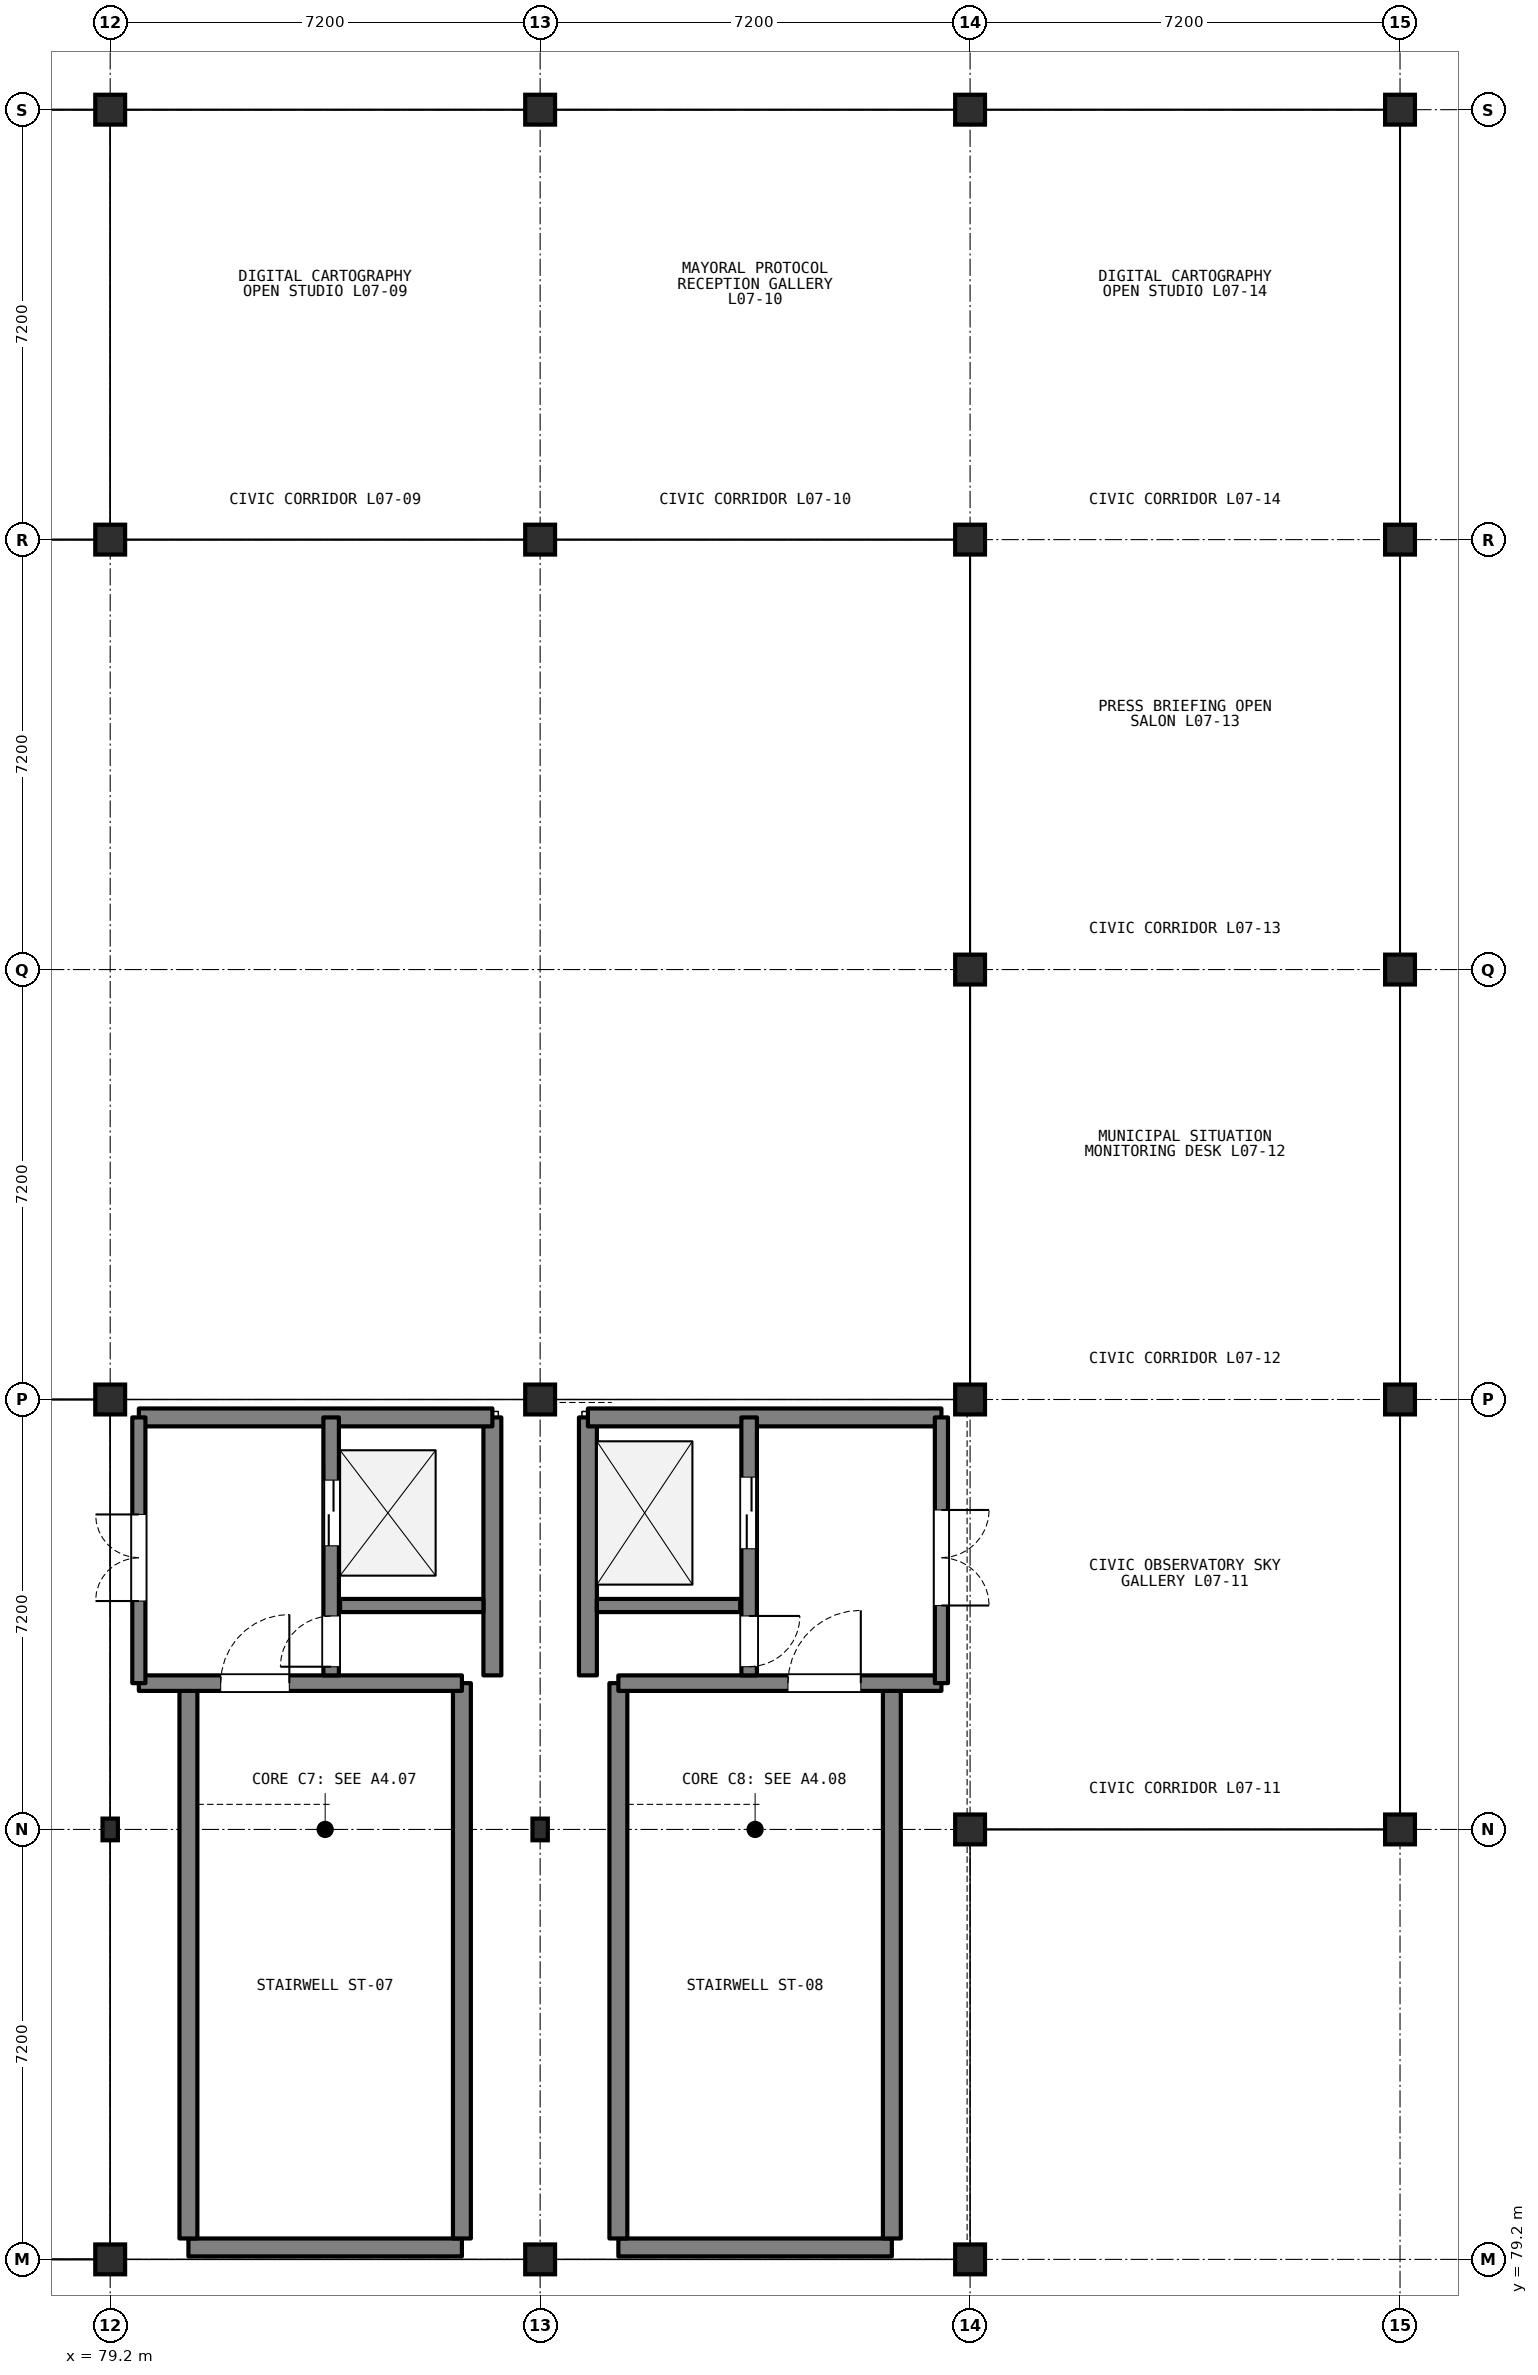
"""IFC4 building model, lengths in metres.
Left out: names, types, materials, properties, quantities, classifications, styles, units other than length and angle.
Written with IfcOpenShell. Run it as: python <this file> out.ifc"""

import sys

from ifc_helpers import new_model, si_unit, direction, frame, frame_2d, origin, origin_2d, place, context, subcontext, project, spatial, rectangle, i_section, extrude, element, fill, save


model = new_model("IFC4")
c1 = context("Model", 3, precision=1e-05, world=origin(), true_north=direction((0.0, 1.0)))
c2 = subcontext(c1, "Body", "Model", "MODEL_VIEW")
j1 = project(units=[si_unit("LENGTHUNIT", "METRE"), si_unit("PLANEANGLEUNIT", "RADIAN")], contexts=[c1])
p1 = place(None, origin())
s1 = spatial("IfcSite", under=j1, at=p1, CompositionType="ELEMENT")
p2 = place(p1, origin())
s2 = spatial("IfcBuilding", under=s1, at=p2, CompositionType="ELEMENT")
p3 = place(p2, frame((0.0, 0.0, 25.8)))
s3 = spatial("IfcBuildingStorey", under=s2, at=p3, CompositionType="ELEMENT", Elevation=25.8)
p4 = place(p3, frame((79.2, 79.2, 0.0), z_axis=(0.0, 0.0, 1.0), x_axis=(1.0, 0.0, 0.0)))
e1 = element("IfcColumn", 1, at=p4, inside=s3, PredefinedType="COLUMN", context=c2, shape_type="SweptSolid", body=[
    extrude(rectangle(XDim=0.5, YDim=0.5, at=origin_2d()), origin(), (0.0, 0.0, 1.0), 2.437),
])
p5 = place(p3, frame((79.2, 86.4, 0.0), z_axis=(0.0, 0.0, 1.0), x_axis=(1.0, 0.0, 0.0)))
e2 = element("IfcColumn", 2, at=p5, inside=s3, PredefinedType="COLUMN", context=c2, shape_type="SweptSolid", body=[
    extrude(i_section(OverallWidth=0.257, OverallDepth=0.363, WebThickness=0.013, FlangeThickness=0.022, FilletRadius=0.015, at=origin_2d()), origin(), (0.0, 0.0, 1.0), 3.733),
])
for number, where, z_axis, x_axis in (
    (3, (79.2, 93.6, 0.0), (0.0, 0.0, 1.0), (1.0, 0.0, 0.0)),
    (4, (79.2, 108.0, 0.0), (0.0, 0.0, 1.0), (1.0, 0.0, 0.0)),
    (5, (79.2, 115.2, 0.0), (0.0, 0.0, 1.0), (1.0, 0.0, 0.0)),
):
    element("IfcColumn", number, at=place(p3, frame(where, z_axis=z_axis, x_axis=x_axis)), inside=s3, PredefinedType="COLUMN", context=c2, shape_type="SweptSolid", body=[
        extrude(rectangle(XDim=0.5, YDim=0.5, at=origin_2d()), origin(), (0.0, 0.0, 1.0), 4.2),
    ])
p6 = place(p3, frame((86.4, 79.2, 0.0), z_axis=(0.0, 0.0, 1.0), x_axis=(1.0, 0.0, 0.0)))
e6 = element("IfcColumn", 6, at=p6, inside=s3, PredefinedType="COLUMN", context=c2, shape_type="SweptSolid", body=[
    extrude(rectangle(XDim=0.5, YDim=0.5, at=origin_2d()), origin(), (0.0, 0.0, 1.0), 2.437),
])
p7 = place(p3, frame((86.4, 86.4, 0.0), z_axis=(0.0, 0.0, 1.0), x_axis=(1.0, 0.0, 0.0)))
e7 = element("IfcColumn", 7, at=p7, inside=s3, PredefinedType="COLUMN", context=c2, shape_type="SweptSolid", body=[
    extrude(i_section(OverallWidth=0.257, OverallDepth=0.363, WebThickness=0.013, FlangeThickness=0.022, FilletRadius=0.015, at=origin_2d()), origin(), (0.0, 0.0, 1.0), 3.733),
])
for number, where, z_axis, x_axis in (
    (8, (86.4, 93.6, 0.0), (0.0, 0.0, 1.0), (1.0, 0.0, 0.0)),
    (9, (86.4, 108.0, 0.0), (0.0, 0.0, 1.0), (1.0, 0.0, 0.0)),
    (10, (86.4, 115.2, 0.0), (0.0, 0.0, 1.0), (1.0, 0.0, 0.0)),
):
    element("IfcColumn", number, at=place(p3, frame(where, z_axis=z_axis, x_axis=x_axis)), inside=s3, PredefinedType="COLUMN", context=c2, shape_type="SweptSolid", body=[
        extrude(rectangle(XDim=0.5, YDim=0.5, at=origin_2d()), origin(), (0.0, 0.0, 1.0), 4.2),
    ])
p8 = place(p3, frame((93.6, 79.2, 0.0), z_axis=(0.0, 0.0, 1.0), x_axis=(1.0, 0.0, 0.0)))
e11 = element("IfcColumn", 11, at=p8, inside=s3, PredefinedType="COLUMN", context=c2, shape_type="SweptSolid", body=[
    extrude(rectangle(XDim=0.5, YDim=0.5, at=origin_2d()), origin(), (0.0, 0.0, 1.0), 2.437),
])
p9 = place(p3, frame((93.6, 86.4, 0.0), z_axis=(0.0, 0.0, 1.0), x_axis=(1.0, 0.0, 0.0)))
e12 = element("IfcColumn", 12, at=p9, inside=s3, PredefinedType="COLUMN", context=c2, shape_type="SweptSolid", body=[
    extrude(rectangle(XDim=0.5, YDim=0.5, at=origin_2d()), origin(), (0.0, 0.0, 1.0), 3.733),
])
for number, where, z_axis, x_axis in (
    (13, (93.6, 93.6, 0.0), (0.0, 0.0, 1.0), (1.0, 0.0, 0.0)),
    (14, (93.6, 100.8, 0.0), (0.0, 0.0, 1.0), (1.0, 0.0, 0.0)),
    (15, (93.6, 108.0, 0.0), (0.0, 0.0, 1.0), (1.0, 0.0, 0.0)),
    (16, (93.6, 115.2, 0.0), (0.0, 0.0, 1.0), (1.0, 0.0, 0.0)),
):
    element("IfcColumn", number, at=place(p3, frame(where, z_axis=z_axis, x_axis=x_axis)), inside=s3, PredefinedType="COLUMN", context=c2, shape_type="SweptSolid", body=[
        extrude(rectangle(XDim=0.5, YDim=0.5, at=origin_2d()), origin(), (0.0, 0.0, 1.0), 4.2),
    ])
p10 = place(p3, frame((100.8, 86.4, 0.0), z_axis=(0.0, 0.0, 1.0), x_axis=(1.0, 0.0, 0.0)))
e17 = element("IfcColumn", 17, at=p10, inside=s3, PredefinedType="COLUMN", context=c2, shape_type="SweptSolid", body=[
    extrude(rectangle(XDim=0.5, YDim=0.5, at=origin_2d()), origin(), (0.0, 0.0, 1.0), 3.733),
])
for number, where, z_axis, x_axis in (
    (18, (100.8, 93.6, 0.0), (0.0, 0.0, 1.0), (1.0, 0.0, 0.0)),
    (19, (100.8, 100.8, 0.0), (0.0, 0.0, 1.0), (1.0, 0.0, 0.0)),
    (20, (100.8, 108.0, 0.0), (0.0, 0.0, 1.0), (1.0, 0.0, 0.0)),
    (21, (100.8, 115.2, 0.0), (0.0, 0.0, 1.0), (1.0, 0.0, 0.0)),
):
    element("IfcColumn", number, at=place(p3, frame(where, z_axis=z_axis, x_axis=x_axis)), inside=s3, PredefinedType="COLUMN", context=c2, shape_type="SweptSolid", body=[
        extrude(rectangle(XDim=0.5, YDim=0.5, at=origin_2d()), origin(), (0.0, 0.0, 1.0), 4.2),
    ])
p11 = place(p3, frame((80.51, 79.4, 0.0), z_axis=(0.0, 0.0, 1.0), x_axis=(1.0, 0.0, 0.0)))
e22 = element("IfcWall", 22, at=p11, inside=s3, PredefinedType="SHEAR", context=c2, shape_type="SweptSolid", body=[
    extrude(rectangle(XDim=4.58, YDim=0.3, at=frame_2d((2.29, 0.0))), origin(), (0.0, 0.0, 1.0), 5.26),
])
for number, where, z_axis, x_axis in (
    (23, (80.51, 79.55, 0.0), (0.0, 0.0, 1.0), (0.0, 1.0, 0.0)),
    (24, (85.09, 79.55, 0.0), (0.0, 0.0, 1.0), (0.0, 1.0, 0.0)),
):
    element("IfcWall", number, at=place(p3, frame(where, z_axis=z_axis, x_axis=x_axis)), inside=s3, PredefinedType="SHEAR", context=c2, shape_type="SweptSolid", body=[
        extrude(rectangle(XDim=9.3, YDim=0.3, at=frame_2d((4.65, 0.0))), origin(), (0.0, 0.0, 1.0), 5.26),
    ])
p12 = place(p3, frame((79.68, 88.85, 0.0), z_axis=(0.0, 0.0, 1.0), x_axis=(1.0, 0.0, 0.0)))
e25 = element("IfcWall", 25, at=p12, inside=s3, PredefinedType="SHEAR", context=c2, shape_type="SweptSolid", body=[
    extrude(rectangle(XDim=5.41, YDim=0.26, at=frame_2d((2.705, 0.0))), origin(), (0.0, 0.0, 1.0), 5.26),
])
p13 = place(p12, frame((1.37, 0.0, 0.0)))
e26 = element("IfcOpeningElement", 26, at=p13, cuts=e25, PredefinedType="OPENING", context=c2, shape_type="SweptSolid", body=[
    extrude(rectangle(XDim=1.15, YDim=2.15, at=frame_2d((0.575, 1.075))), frame((0.0, 0.14, 0.0), z_axis=(0.0, -1.0, 0.0), x_axis=(1.0, 0.0, 0.0)), (0.0, 0.0, 1.0), 0.28),
])
p14 = place(p3, frame((85.6, 88.98, 0.0), z_axis=(0.0, 0.0, 1.0), x_axis=(0.0, 1.0, 0.0)))
e27 = element("IfcWall", 27, at=p14, inside=s3, PredefinedType="SHEAR", context=c2, shape_type="SweptSolid", body=[
    extrude(rectangle(XDim=4.32, YDim=0.3, at=frame_2d((2.16, 0.0))), origin(), (0.0, 0.0, 1.0), 5.26),
])
p15 = place(p3, frame((79.68, 93.3, 0.0), z_axis=(0.0, 0.0, 1.0), x_axis=(1.0, 0.0, 0.0)))
e28 = element("IfcWall", 28, at=p15, inside=s3, PredefinedType="SHEAR", context=c2, shape_type="SweptSolid", body=[
    extrude(rectangle(XDim=5.92, YDim=0.3, at=frame_2d((2.96, 0.0))), origin(), (0.0, 0.0, 1.0), 5.26),
])
p16 = place(p3, frame((83.05, 90.15, 0.0), z_axis=(0.0, 0.0, 1.0), x_axis=(1.0, 0.0, 0.0)))
e29 = element("IfcWall", 29, at=p16, inside=s3, PredefinedType="SHEAR", context=c2, shape_type="SweptSolid", body=[
    extrude(rectangle(XDim=2.4, YDim=0.22, at=frame_2d((1.2, 0.0))), origin(), (0.0, 0.0, 1.0), 5.26),
])
p17 = place(p3, frame((82.9, 88.98, 0.0), z_axis=(0.0, 0.0, 1.0), x_axis=(0.0, 1.0, 0.0)))
e30 = element("IfcWall", 30, at=p17, inside=s3, PredefinedType="SHEAR", context=c2, shape_type="SweptSolid", body=[
    extrude(rectangle(XDim=4.32, YDim=0.26, at=frame_2d((2.16, 0.0))), origin(), (0.0, 0.0, 1.0), 5.26),
])
p18 = place(p17, frame((2.17, 0.0, 0.0)))
e31 = element("IfcOpeningElement", 31, at=p18, cuts=e30, PredefinedType="OPENING", context=c2, shape_type="SweptSolid", body=[
    extrude(rectangle(XDim=1.1, YDim=2.15, at=frame_2d((0.55, 1.075))), frame((0.0, 0.14, 0.0), z_axis=(0.0, -1.0, 0.0), x_axis=(1.0, 0.0, 0.0)), (0.0, 0.0, 1.0), 0.28),
])
p19 = place(p17, frame((0.145, 0.0, 0.0)))
e32 = element("IfcOpeningElement", 32, at=p19, cuts=e30, PredefinedType="OPENING", context=c2, shape_type="SweptSolid", body=[
    extrude(rectangle(XDim=0.85, YDim=2.05, at=frame_2d((0.425, 1.025))), frame((0.0, 0.14, 0.0), z_axis=(0.0, -1.0, 0.0), x_axis=(1.0, 0.0, 0.0)), (0.0, 0.0, 1.0), 0.28),
])
p20 = place(p3, frame((79.68, 88.85, 0.0), z_axis=(0.0, 0.0, 1.0), x_axis=(0.0, 1.0, 0.0)))
e33 = element("IfcWall", 33, at=p20, inside=s3, PredefinedType="SHEAR", context=c2, shape_type="SweptSolid", body=[
    extrude(rectangle(XDim=4.45, YDim=0.22, at=frame_2d((2.225, 0.0))), origin(), (0.0, 0.0, 1.0), 5.26),
])
p21 = place(p20, frame((1.375, 0.0, 0.0)))
e34 = element("IfcOpeningElement", 34, at=p21, cuts=e33, PredefinedType="OPENING", context=c2, shape_type="SweptSolid", body=[
    extrude(rectangle(XDim=1.45, YDim=2.2, at=frame_2d((0.725, 1.1))), frame((0.0, 0.12, 0.0), z_axis=(0.0, -1.0, 0.0), x_axis=(1.0, 0.0, 0.0)), (0.0, 0.0, 1.0), 0.24),
])
p22 = place(p3, frame((87.71, 79.4, 0.0), z_axis=(0.0, 0.0, 1.0), x_axis=(1.0, 0.0, 0.0)))
e35 = element("IfcWall", 35, at=p22, inside=s3, PredefinedType="SHEAR", context=c2, shape_type="SweptSolid", body=[
    extrude(rectangle(XDim=4.58, YDim=0.3, at=frame_2d((2.29, 0.0))), origin(), (0.0, 0.0, 1.0), 5.26),
])
for number, where, z_axis, x_axis in (
    (36, (87.71, 79.55, 0.0), (0.0, 0.0, 1.0), (0.0, 1.0, 0.0)),
    (37, (92.29, 79.55, 0.0), (0.0, 0.0, 1.0), (0.0, 1.0, 0.0)),
):
    element("IfcWall", number, at=place(p3, frame(where, z_axis=z_axis, x_axis=x_axis)), inside=s3, PredefinedType="SHEAR", context=c2, shape_type="SweptSolid", body=[
        extrude(rectangle(XDim=9.3, YDim=0.3, at=frame_2d((4.65, 0.0))), origin(), (0.0, 0.0, 1.0), 5.26),
    ])
p23 = place(p3, frame((87.71, 88.85, 0.0), z_axis=(0.0, 0.0, 1.0), x_axis=(1.0, 0.0, 0.0)))
e38 = element("IfcWall", 38, at=p23, inside=s3, PredefinedType="SHEAR", context=c2, shape_type="SweptSolid", body=[
    extrude(rectangle(XDim=5.41, YDim=0.26, at=frame_2d((2.705, 0.0))), origin(), (0.0, 0.0, 1.0), 5.26),
])
p24 = place(p23, frame((2.84, 0.0, 0.0)))
e39 = element("IfcOpeningElement", 39, at=p24, cuts=e38, PredefinedType="OPENING", context=c2, shape_type="SweptSolid", body=[
    extrude(rectangle(XDim=1.22, YDim=2.15, at=frame_2d((0.61, 1.075))), frame((0.0, 0.14, 0.0), z_axis=(0.0, -1.0, 0.0), x_axis=(1.0, 0.0, 0.0)), (0.0, 0.0, 1.0), 0.28),
])
p25 = place(p3, frame((87.2, 88.98, 0.0), z_axis=(0.0, 0.0, 1.0), x_axis=(0.0, 1.0, 0.0)))
e40 = element("IfcWall", 40, at=p25, inside=s3, PredefinedType="SHEAR", context=c2, shape_type="SweptSolid", body=[
    extrude(rectangle(XDim=4.32, YDim=0.3, at=frame_2d((2.16, 0.0))), origin(), (0.0, 0.0, 1.0), 5.26),
])
p26 = place(p3, frame((87.2, 93.3, 0.0), z_axis=(0.0, 0.0, 1.0), x_axis=(1.0, 0.0, 0.0)))
e41 = element("IfcWall", 41, at=p26, inside=s3, PredefinedType="SHEAR", context=c2, shape_type="SweptSolid", body=[
    extrude(rectangle(XDim=5.92, YDim=0.3, at=frame_2d((2.96, 0.0))), origin(), (0.0, 0.0, 1.0), 5.26),
])
p27 = place(p3, frame((87.35, 90.15, 0.0), z_axis=(0.0, 0.0, 1.0), x_axis=(1.0, 0.0, 0.0)))
e42 = element("IfcWall", 42, at=p27, inside=s3, PredefinedType="SHEAR", context=c2, shape_type="SweptSolid", body=[
    extrude(rectangle(XDim=2.4, YDim=0.22, at=frame_2d((1.2, 0.0))), origin(), (0.0, 0.0, 1.0), 5.26),
])
p28 = place(p3, frame((89.9, 93.3, 0.0), z_axis=(0.0, 0.0, 1.0), x_axis=(0.0, -1.0, 0.0)))
e43 = element("IfcWall", 43, at=p28, inside=s3, PredefinedType="SHEAR", context=c2, shape_type="SweptSolid", body=[
    extrude(rectangle(XDim=4.32, YDim=0.26, at=frame_2d((2.16, 0.0))), origin(), (0.0, 0.0, 1.0), 5.26),
])
p29 = place(p28, frame((1.0, 0.0, 0.0)))
e44 = element("IfcOpeningElement", 44, at=p29, cuts=e43, PredefinedType="OPENING", context=c2, shape_type="SweptSolid", body=[
    extrude(rectangle(XDim=1.2, YDim=2.15, at=frame_2d((0.6, 1.075))), frame((0.0, 0.14, 0.0), z_axis=(0.0, -1.0, 0.0), x_axis=(1.0, 0.0, 0.0)), (0.0, 0.0, 1.0), 0.28),
])
p30 = place(p28, frame((3.325, 0.0, 0.0)))
e45 = element("IfcOpeningElement", 45, at=p30, cuts=e43, PredefinedType="OPENING", context=c2, shape_type="SweptSolid", body=[
    extrude(rectangle(XDim=0.85, YDim=2.05, at=frame_2d((0.425, 1.025))), frame((0.0, 0.14, 0.0), z_axis=(0.0, -1.0, 0.0), x_axis=(1.0, 0.0, 0.0)), (0.0, 0.0, 1.0), 0.28),
])
p31 = place(p3, frame((93.12, 93.3, 0.0), z_axis=(0.0, 0.0, 1.0), x_axis=(0.0, -1.0, 0.0)))
e46 = element("IfcWall", 46, at=p31, inside=s3, PredefinedType="SHEAR", context=c2, shape_type="SweptSolid", body=[
    extrude(rectangle(XDim=4.45, YDim=0.22, at=frame_2d((2.225, 0.0))), origin(), (0.0, 0.0, 1.0), 5.26),
])
p32 = place(p31, frame((1.55, 0.0, 0.0)))
e47 = element("IfcOpeningElement", 47, at=p32, cuts=e46, PredefinedType="OPENING", context=c2, shape_type="SweptSolid", body=[
    extrude(rectangle(XDim=1.6, YDim=2.2, at=frame_2d((0.8, 1.1))), frame((0.0, 0.12, 0.0), z_axis=(0.0, -1.0, 0.0), x_axis=(1.0, 0.0, 0.0)), (0.0, 0.0, 1.0), 0.24),
])
p33 = place(p13, origin())
e48 = element("IfcDoor", 48, at=p33, inside=s3, OperationType="SINGLE_SWING_RIGHT", PredefinedType="DOOR", context=c2, shape_type="SweptSolid", body=[
    extrude(rectangle(XDim=1.15, YDim=2.15, at=frame_2d((0.575, 1.075))), frame((0.0, 0.025, 0.0), z_axis=(0.0, -1.0, 0.0), x_axis=(1.0, 0.0, 0.0)), (0.0, 0.0, 1.0), 0.05),
])
fill(e26, e48)
p34 = place(p18, origin())
e49 = element("IfcDoor", 49, at=p34, inside=s3, OperationType="DOUBLE_DOOR_SLIDING", PredefinedType="DOOR", context=c2, shape_type="SweptSolid", body=[
    extrude(rectangle(XDim=1.1, YDim=2.15, at=frame_2d((0.55, 1.075))), frame((0.0, 0.025, 0.0), z_axis=(0.0, -1.0, 0.0), x_axis=(1.0, 0.0, 0.0)), (0.0, 0.0, 1.0), 0.05),
])
fill(e31, e49)
p35 = place(p19, origin())
e50 = element("IfcDoor", 50, at=p35, inside=s3, OperationType="SINGLE_SWING_LEFT", PredefinedType="DOOR", context=c2, shape_type="SweptSolid", body=[
    extrude(rectangle(XDim=0.85, YDim=2.05, at=frame_2d((0.425, 1.025))), frame((0.0, 0.025, 0.0), z_axis=(0.0, -1.0, 0.0), x_axis=(1.0, 0.0, 0.0)), (0.0, 0.0, 1.0), 0.05),
])
fill(e32, e50)
p36 = place(p21, origin())
e51 = element("IfcDoor", 51, at=p36, inside=s3, OperationType="DOUBLE_DOOR_SINGLE_SWING", PredefinedType="DOOR", context=c2, shape_type="SweptSolid", body=[
    extrude(rectangle(XDim=1.45, YDim=2.2, at=frame_2d((0.725, 1.1))), frame((0.0, 0.025, 0.0), z_axis=(0.0, -1.0, 0.0), x_axis=(1.0, 0.0, 0.0)), (0.0, 0.0, 1.0), 0.05),
])
fill(e34, e51)
p37 = place(p24, origin())
e52 = element("IfcDoor", 52, at=p37, inside=s3, OperationType="SINGLE_SWING_RIGHT", PredefinedType="DOOR", context=c2, shape_type="SweptSolid", body=[
    extrude(rectangle(XDim=1.22, YDim=2.15, at=frame_2d((0.61, 1.075))), frame((0.0, 0.025, 0.0), z_axis=(0.0, -1.0, 0.0), x_axis=(1.0, 0.0, 0.0)), (0.0, 0.0, 1.0), 0.05),
])
fill(e39, e52)
p38 = place(p29, origin())
e53 = element("IfcDoor", 53, at=p38, inside=s3, OperationType="DOUBLE_DOOR_SLIDING", PredefinedType="DOOR", context=c2, shape_type="SweptSolid", body=[
    extrude(rectangle(XDim=1.2, YDim=2.15, at=frame_2d((0.6, 1.075))), frame((0.0, 0.025, 0.0), z_axis=(0.0, -1.0, 0.0), x_axis=(1.0, 0.0, 0.0)), (0.0, 0.0, 1.0), 0.05),
])
fill(e44, e53)
p39 = place(p30, origin())
e54 = element("IfcDoor", 54, at=p39, inside=s3, OperationType="SINGLE_SWING_LEFT", PredefinedType="DOOR", context=c2, shape_type="SweptSolid", body=[
    extrude(rectangle(XDim=0.85, YDim=2.05, at=frame_2d((0.425, 1.025))), frame((0.0, 0.025, 0.0), z_axis=(0.0, -1.0, 0.0), x_axis=(1.0, 0.0, 0.0)), (0.0, 0.0, 1.0), 0.05),
])
fill(e45, e54)
p40 = place(p32, origin())
e55 = element("IfcDoor", 55, at=p40, inside=s3, OperationType="DOUBLE_DOOR_SINGLE_SWING", PredefinedType="DOOR", context=c2, shape_type="SweptSolid", body=[
    extrude(rectangle(XDim=1.6, YDim=2.2, at=frame_2d((0.8, 1.1))), frame((0.0, 0.025, 0.0), z_axis=(0.0, -1.0, 0.0), x_axis=(1.0, 0.0, 0.0)), (0.0, 0.0, 1.0), 0.05),
])
fill(e47, e55)
save(model, sys.argv[1])
